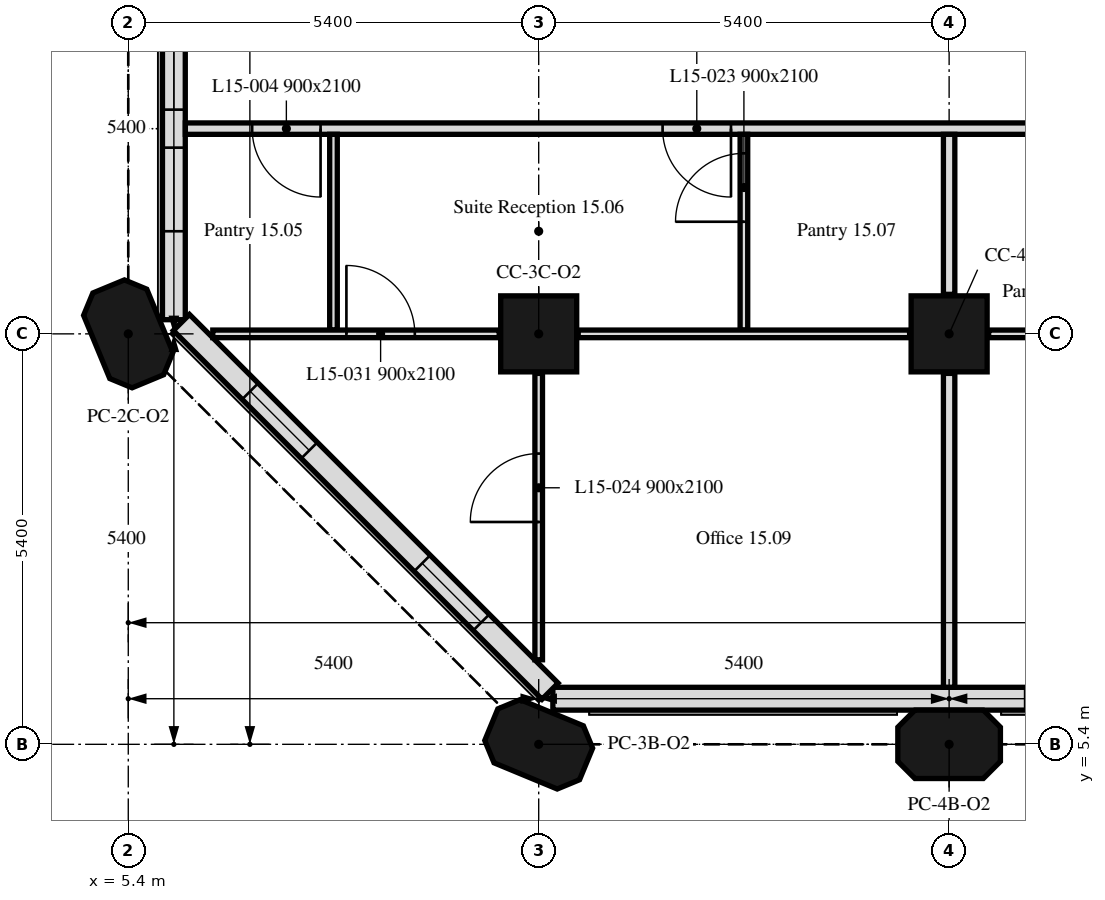
"""IFC4 building model, lengths in metres.
Left out: names, types, materials, properties, quantities, classifications, styles, units other than length and angle.
Written with IfcOpenShell. Run it as: python <this file> out.ifc"""

import sys

from ifc_helpers import new_model, si_unit, direction, frame, frame_2d, origin, origin_2d, place, context, subcontext, project, spatial, polyline, rectangle, outline, extrude, element, fill, save


model = new_model("IFC4")
c1 = context("Model", 3, precision=1e-05, world=origin(), true_north=direction((0.0, 1.0)))
c2 = subcontext(c1, "Body", "Model", "MODEL_VIEW")
j1 = project(units=[si_unit("LENGTHUNIT", "METRE"), si_unit("PLANEANGLEUNIT", "RADIAN")], contexts=[c1])
p1 = place(None, origin())
s1 = spatial("IfcSite", under=j1, at=p1, CompositionType="ELEMENT")
p2 = place(p1, origin())
s2 = spatial("IfcBuilding", under=s1, at=p2, CompositionType="ELEMENT")
p3 = place(p2, frame((0.0, 0.0, 68.8)))
s3 = spatial("IfcBuildingStorey", under=s2, at=p3, CompositionType="ELEMENT", Elevation=68.8)
for number, where, z_axis, x_axis in (
    (1, (10.8, 5.4, 0.0), (0.0, 0.0, 1.0), (-0.924, 0.383, 0.0)),
    (2, (16.2, 5.4, 0.0), (0.0, 0.0, 1.0), (1.0, 0.0, 0.0)),
    (3, (5.4, 10.8, 0.0), (0.0, 0.0, 1.0), (-0.383, 0.924, 0.0)),
):
    element("IfcColumn", number, at=place(p3, frame(where, z_axis=z_axis, x_axis=x_axis)), inside=s3, PredefinedType="COLUMN", context=c2, shape_type="SweptSolid", body=[
        extrude(outline(polyline([(-0.45, -0.45), (0.45, -0.45), (0.675, -0.225), (0.675, 0.225), (0.45, 0.45), (-0.45, 0.45), (-0.675, 0.225), (-0.675, -0.225), (-0.45, -0.45)])), origin(), (0.0, 0.0, 1.0), 3.5),
    ])
for number, where, z_axis, x_axis in (
    (4, (10.8, 10.8, 0.0), (0.0, 0.0, 1.0), (1.0, 0.0, 0.0)),
    (5, (16.2, 10.8, 0.0), (0.0, 0.0, 1.0), (1.0, 0.0, 0.0)),
):
    element("IfcColumn", number, at=place(p3, frame(where, z_axis=z_axis, x_axis=x_axis)), inside=s3, PredefinedType="COLUMN", context=c2, shape_type="SweptSolid", body=[
        extrude(rectangle(XDim=1.0, YDim=1.0, at=origin_2d()), origin(), (0.0, 0.0, 1.0), 3.5),
    ])
p4 = place(p3, frame((10.986, 6.0, 0.0), z_axis=(0.0, 0.0, 1.0), x_axis=(1.0, 0.0, 0.0)))
e6 = element("IfcWall", 6, at=p4, inside=s3, PredefinedType="SOLIDWALL", context=c2, shape_type="SweptSolid", body=[
    extrude(rectangle(XDim=32.027, YDim=0.3, at=frame_2d((16.014, 0.0))), origin(), (0.0, 0.0, 1.0), 3.5),
])
p5 = place(p4, frame((6.214, 0.0, 0.9)))
e7 = element("IfcOpeningElement", 7, at=p5, cuts=e6, PredefinedType="OPENING", context=c2, shape_type="SweptSolid", body=[
    extrude(rectangle(XDim=3.4, YDim=1.7, at=frame_2d((1.7, 0.85))), frame((0.0, 0.16, 0.0), z_axis=(0.0, -1.0, 0.0), x_axis=(1.0, 0.0, 0.0)), (0.0, 0.0, 1.0), 0.32),
])
p6 = place(p4, frame((17.014, 0.0, 0.9)))
e8 = element("IfcOpeningElement", 8, at=p6, cuts=e6, PredefinedType="OPENING", context=c2, shape_type="SweptSolid", body=[
    extrude(rectangle(XDim=3.4, YDim=1.7, at=frame_2d((1.7, 0.85))), frame((0.0, 0.16, 0.0), z_axis=(0.0, -1.0, 0.0), x_axis=(1.0, 0.0, 0.0)), (0.0, 0.0, 1.0), 0.32),
])
p7 = place(p4, frame((27.814, 0.0, 0.9)))
e9 = element("IfcOpeningElement", 9, at=p7, cuts=e6, PredefinedType="OPENING", context=c2, shape_type="SweptSolid", body=[
    extrude(rectangle(XDim=3.4, YDim=1.7, at=frame_2d((1.7, 0.85))), frame((0.0, 0.16, 0.0), z_axis=(0.0, -1.0, 0.0), x_axis=(1.0, 0.0, 0.0)), (0.0, 0.0, 1.0), 0.32),
])
p8 = place(p3, frame((6.0, 16.2, 0.0), z_axis=(0.0, 0.0, 1.0), x_axis=(0.0, -1.0, 0.0)))
e10 = element("IfcWall", 10, at=p8, inside=s3, PredefinedType="SOLIDWALL", context=c2, shape_type="SweptSolid", body=[
    extrude(rectangle(XDim=5.214, YDim=0.3, at=frame_2d((2.607, 0.0))), origin(), (0.0, 0.0, 1.0), 3.5),
])
p9 = place(p8, frame((1.35, 0.0, 0.9)))
e11 = element("IfcOpeningElement", 11, at=p9, cuts=e10, PredefinedType="OPENING", context=c2, shape_type="SweptSolid", body=[
    extrude(rectangle(XDim=1.1, YDim=1.7, at=frame_2d((0.55, 0.85))), frame((0.0, 0.16, 0.0), z_axis=(0.0, -1.0, 0.0), x_axis=(1.0, 0.0, 0.0)), (0.0, 0.0, 1.0), 0.32),
])
p10 = place(p8, frame((2.95, 0.0, 0.9)))
e12 = element("IfcOpeningElement", 12, at=p10, cuts=e10, PredefinedType="OPENING", context=c2, shape_type="SweptSolid", body=[
    extrude(rectangle(XDim=1.1, YDim=1.7, at=frame_2d((0.55, 0.85))), frame((0.0, 0.16, 0.0), z_axis=(0.0, -1.0, 0.0), x_axis=(1.0, 0.0, 0.0)), (0.0, 0.0, 1.0), 0.32),
])
p11 = place(p3, frame((6.099, 10.949, 0.0), z_axis=(0.0, 0.0, 1.0), x_axis=(0.707106781187, -0.707106781187, 0.0)))
e13 = element("IfcWall", 13, at=p11, inside=s3, PredefinedType="SOLIDWALL", context=c2, shape_type="SweptSolid", body=[
    extrude(rectangle(XDim=6.86, YDim=0.3, at=frame_2d((3.43, 0.0))), origin(), (0.0, 0.0, 1.0), 3.5),
])
p12 = place(p11, frame((1.28, 0.0, 0.9)))
e14 = element("IfcOpeningElement", 14, at=p12, cuts=e13, PredefinedType="OPENING", context=c2, shape_type="SweptSolid", body=[
    extrude(rectangle(XDim=1.1, YDim=1.7, at=frame_2d((0.55, 0.85))), frame((0.0, 0.16, 0.0), z_axis=(0.0, -1.0, 0.0), x_axis=(1.0, 0.0, 0.0)), (0.0, 0.0, 1.0), 0.32),
])
p13 = place(p11, frame((4.48, 0.0, 0.9)))
e15 = element("IfcOpeningElement", 15, at=p13, cuts=e13, PredefinedType="OPENING", context=c2, shape_type="SweptSolid", body=[
    extrude(rectangle(XDim=1.1, YDim=1.7, at=frame_2d((0.55, 0.85))), frame((0.0, 0.16, 0.0), z_axis=(0.0, -1.0, 0.0), x_axis=(1.0, 0.0, 0.0)), (0.0, 0.0, 1.0), 0.32),
])
p14 = place(p3, frame((21.5, 13.5, 0.0), z_axis=(0.0, 0.0, 1.0), x_axis=(-1.0, 0.0, 0.0)))
e16 = element("IfcWall", 16, at=p14, inside=s3, PredefinedType="PARTITIONING", context=c2, shape_type="SweptSolid", body=[
    extrude(rectangle(XDim=15.349, YDim=0.15, at=frame_2d((7.675, 0.0))), origin(), (0.0, 0.0, 1.0), 3.5),
])
p15 = place(p14, frame((13.57, 0.0, 0.0)))
e17 = element("IfcOpeningElement", 17, at=p15, cuts=e16, PredefinedType="OPENING", context=c2, shape_type="SweptSolid", body=[
    extrude(rectangle(XDim=0.9, YDim=2.1, at=frame_2d((0.45, 1.05))), frame((0.0, 0.075, 0.0), z_axis=(0.0, -1.0, 0.0), x_axis=(1.0, 0.0, 0.0)), (0.0, 0.0, 1.0), 0.15),
])
p16 = place(p14, frame((2.77, 0.0, 0.0)))
e18 = element("IfcOpeningElement", 18, at=p16, cuts=e16, PredefinedType="OPENING", context=c2, shape_type="SweptSolid", body=[
    extrude(rectangle(XDim=0.9, YDim=2.1, at=frame_2d((0.45, 1.05))), frame((0.0, 0.075, 0.0), z_axis=(0.0, -1.0, 0.0), x_axis=(1.0, 0.0, 0.0)), (0.0, 0.0, 1.0), 0.15),
])
p17 = place(p14, frame((1.53, 0.0, 0.0)))
e19 = element("IfcOpeningElement", 19, at=p17, cuts=e16, PredefinedType="OPENING", context=c2, shape_type="SweptSolid", body=[
    extrude(rectangle(XDim=0.9, YDim=2.1, at=frame_2d((0.45, 1.05))), frame((0.0, 0.075, 0.0), z_axis=(0.0, -1.0, 0.0), x_axis=(1.0, 0.0, 0.0)), (0.0, 0.0, 1.0), 0.15),
])
p18 = place(p14, frame((8.17, 0.0, 0.0)))
e20 = element("IfcOpeningElement", 20, at=p18, cuts=e16, PredefinedType="OPENING", context=c2, shape_type="SweptSolid", body=[
    extrude(rectangle(XDim=0.9, YDim=2.1, at=frame_2d((0.45, 1.05))), frame((0.0, 0.075, 0.0), z_axis=(0.0, -1.0, 0.0), x_axis=(1.0, 0.0, 0.0)), (0.0, 0.0, 1.0), 0.15),
])
p19 = place(p3, frame((8.1, 10.85, 0.0), z_axis=(0.0, 0.0, 1.0), x_axis=(0.0, 1.0, 0.0)))
e21 = element("IfcWall", 21, at=p19, inside=s3, PredefinedType="PARTITIONING", context=c2, shape_type="SweptSolid", body=[
    extrude(rectangle(XDim=2.575, YDim=0.1, at=frame_2d((1.288, 0.0))), origin(), (0.0, 0.0, 1.0), 3.5),
])
p20 = place(p3, frame((6.512, 10.8, 0.0), z_axis=(0.0, 0.0, 1.0), x_axis=(1.0, 0.0, 0.0)))
e22 = element("IfcWall", 22, at=p20, inside=s3, PredefinedType="PARTITIONING", context=c2, shape_type="SweptSolid", body=[
    extrude(rectangle(XDim=3.768, YDim=0.1, at=frame_2d((1.884, 0.0))), origin(), (0.0, 0.0, 1.0), 3.5),
])
p21 = place(p20, frame((1.758, 0.0, 0.0)))
e23 = element("IfcOpeningElement", 23, at=p21, cuts=e22, PredefinedType="OPENING", context=c2, shape_type="SweptSolid", body=[
    extrude(rectangle(XDim=0.9, YDim=2.1, at=frame_2d((0.45, 1.05))), frame((0.0, 0.05, 0.0), z_axis=(0.0, -1.0, 0.0), x_axis=(1.0, 0.0, 0.0)), (0.0, 0.0, 1.0), 0.1),
])
p22 = place(p3, frame((13.5, 10.85, 0.0), z_axis=(0.0, 0.0, 1.0), x_axis=(0.0, 1.0, 0.0)))
e24 = element("IfcWall", 24, at=p22, inside=s3, PredefinedType="PARTITIONING", context=c2, shape_type="SweptSolid", body=[
    extrude(rectangle(XDim=2.575, YDim=0.1, at=frame_2d((1.288, 0.0))), origin(), (0.0, 0.0, 1.0), 3.5),
])
p23 = place(p22, frame((1.425, 0.0, 0.0)))
e25 = element("IfcOpeningElement", 25, at=p23, cuts=e24, PredefinedType="OPENING", context=c2, shape_type="SweptSolid", body=[
    extrude(rectangle(XDim=0.9, YDim=2.1, at=frame_2d((0.45, 1.05))), frame((0.0, 0.05, 0.0), z_axis=(0.0, -1.0, 0.0), x_axis=(1.0, 0.0, 0.0)), (0.0, 0.0, 1.0), 0.1),
])
p24 = place(p3, frame((11.32, 10.8, 0.0), z_axis=(0.0, 0.0, 1.0), x_axis=(1.0, 0.0, 0.0)))
e26 = element("IfcWall", 26, at=p24, inside=s3, PredefinedType="PARTITIONING", context=c2, shape_type="SweptSolid", body=[
    extrude(rectangle(XDim=4.36, YDim=0.1, at=frame_2d((2.18, 0.0))), origin(), (0.0, 0.0, 1.0), 3.5),
])
p25 = place(p3, frame((16.2, 11.32, 0.0), z_axis=(0.0, 0.0, 1.0), x_axis=(0.0, 1.0, 0.0)))
e27 = element("IfcWall", 27, at=p25, inside=s3, PredefinedType="PARTITIONING", context=c2, shape_type="SweptSolid", body=[
    extrude(rectangle(XDim=2.105, YDim=0.15, at=frame_2d((1.052, 0.0))), origin(), (0.0, 0.0, 1.0), 3.5),
])
p26 = place(p3, frame((10.8, 6.512, 0.0), z_axis=(0.0, 0.0, 1.0), x_axis=(0.0, 1.0, 0.0)))
e28 = element("IfcWall", 28, at=p26, inside=s3, PredefinedType="PARTITIONING", context=c2, shape_type="SweptSolid", body=[
    extrude(rectangle(XDim=3.768, YDim=0.1, at=frame_2d((1.884, 0.0))), origin(), (0.0, 0.0, 1.0), 3.5),
])
p27 = place(p26, frame((1.813, 0.0, 0.0)))
e29 = element("IfcOpeningElement", 29, at=p27, cuts=e28, PredefinedType="OPENING", context=c2, shape_type="SweptSolid", body=[
    extrude(rectangle(XDim=0.9, YDim=2.1, at=frame_2d((0.45, 1.05))), frame((0.0, 0.05, 0.0), z_axis=(0.0, -1.0, 0.0), x_axis=(1.0, 0.0, 0.0)), (0.0, 0.0, 1.0), 0.1),
])
p28 = place(p3, frame((16.2, 6.151, 0.0), z_axis=(0.0, 0.0, 1.0), x_axis=(0.0, 1.0, 0.0)))
e30 = element("IfcWall", 30, at=p28, inside=s3, PredefinedType="PARTITIONING", context=c2, shape_type="SweptSolid", body=[
    extrude(rectangle(XDim=4.129, YDim=0.15, at=frame_2d((2.064, 0.0))), origin(), (0.0, 0.0, 1.0), 3.5),
])
p29 = place(p3, frame((16.72, 10.8, 0.0), z_axis=(0.0, 0.0, 1.0), x_axis=(1.0, 0.0, 0.0)))
e31 = element("IfcWall", 31, at=p29, inside=s3, PredefinedType="PARTITIONING", context=c2, shape_type="SweptSolid", body=[
    extrude(rectangle(XDim=4.36, YDim=0.1, at=frame_2d((2.18, 0.0))), origin(), (0.0, 0.0, 1.0), 3.5),
])
p30 = place(p9, origin())
e32 = element("IfcWindow", 32, at=p30, inside=s3, PartitioningType="SINGLE_PANEL", PredefinedType="WINDOW", context=c2, shape_type="SweptSolid", body=[
    extrude(rectangle(XDim=1.1, YDim=1.7, at=frame_2d((0.55, 0.85))), frame((0.0, 0.03, 0.0), z_axis=(0.0, -1.0, 0.0), x_axis=(1.0, 0.0, 0.0)), (0.0, 0.0, 1.0), 0.06),
])
fill(e11, e32)
p31 = place(p10, origin())
e33 = element("IfcWindow", 33, at=p31, inside=s3, PartitioningType="SINGLE_PANEL", PredefinedType="WINDOW", context=c2, shape_type="SweptSolid", body=[
    extrude(rectangle(XDim=1.1, YDim=1.7, at=frame_2d((0.55, 0.85))), frame((0.0, 0.03, 0.0), z_axis=(0.0, -1.0, 0.0), x_axis=(1.0, 0.0, 0.0)), (0.0, 0.0, 1.0), 0.06),
])
fill(e12, e33)
p32 = place(p12, origin())
e34 = element("IfcWindow", 34, at=p32, inside=s3, PartitioningType="SINGLE_PANEL", PredefinedType="WINDOW", context=c2, shape_type="SweptSolid", body=[
    extrude(rectangle(XDim=1.1, YDim=1.7, at=frame_2d((0.55, 0.85))), frame((0.0, 0.03, 0.0), z_axis=(0.0, -1.0, 0.0), x_axis=(1.0, 0.0, 0.0)), (0.0, 0.0, 1.0), 0.06),
])
fill(e14, e34)
p33 = place(p13, origin())
e35 = element("IfcWindow", 35, at=p33, inside=s3, PartitioningType="SINGLE_PANEL", PredefinedType="WINDOW", context=c2, shape_type="SweptSolid", body=[
    extrude(rectangle(XDim=1.1, YDim=1.7, at=frame_2d((0.55, 0.85))), frame((0.0, 0.03, 0.0), z_axis=(0.0, -1.0, 0.0), x_axis=(1.0, 0.0, 0.0)), (0.0, 0.0, 1.0), 0.06),
])
fill(e15, e35)
p34 = place(p15, origin())
e36 = element("IfcDoor", 36, at=p34, inside=s3, OperationType="SINGLE_SWING_RIGHT", PredefinedType="DOOR", context=c2, shape_type="SweptSolid", body=[
    extrude(rectangle(XDim=0.9, YDim=2.1, at=frame_2d((0.45, 1.05))), frame((0.0, 0.025, 0.0), z_axis=(0.0, -1.0, 0.0), x_axis=(1.0, 0.0, 0.0)), (0.0, 0.0, 1.0), 0.05),
])
fill(e17, e36)
p35 = place(p23, origin())
e37 = element("IfcDoor", 37, at=p35, inside=s3, OperationType="SINGLE_SWING_LEFT", PredefinedType="DOOR", context=c2, shape_type="SweptSolid", body=[
    extrude(rectangle(XDim=0.9, YDim=2.1, at=frame_2d((0.45, 1.05))), frame((0.0, 0.025, 0.0), z_axis=(0.0, -1.0, 0.0), x_axis=(1.0, 0.0, 0.0)), (0.0, 0.0, 1.0), 0.05),
])
fill(e25, e37)
p36 = place(p27, origin())
e38 = element("IfcDoor", 38, at=p36, inside=s3, OperationType="SINGLE_SWING_LEFT", PredefinedType="DOOR", context=c2, shape_type="SweptSolid", body=[
    extrude(rectangle(XDim=0.9, YDim=2.1, at=frame_2d((0.45, 1.05))), frame((0.0, 0.025, 0.0), z_axis=(0.0, -1.0, 0.0), x_axis=(1.0, 0.0, 0.0)), (0.0, 0.0, 1.0), 0.05),
])
fill(e29, e38)
p37 = place(p21, origin())
e39 = element("IfcDoor", 39, at=p37, inside=s3, OperationType="SINGLE_SWING_RIGHT", PredefinedType="DOOR", context=c2, shape_type="SweptSolid", body=[
    extrude(rectangle(XDim=0.9, YDim=2.1, at=frame_2d((0.45, 1.05))), frame((0.0, 0.025, 0.0), z_axis=(0.0, -1.0, 0.0), x_axis=(1.0, 0.0, 0.0)), (0.0, 0.0, 1.0), 0.05),
])
fill(e23, e39)
p38 = place(p18, origin())
e40 = element("IfcDoor", 40, at=p38, inside=s3, OperationType="SINGLE_SWING_RIGHT", PredefinedType="DOOR", context=c2, shape_type="SweptSolid", body=[
    extrude(rectangle(XDim=0.9, YDim=2.1, at=frame_2d((0.45, 1.05))), frame((0.0, 0.025, 0.0), z_axis=(0.0, -1.0, 0.0), x_axis=(1.0, 0.0, 0.0)), (0.0, 0.0, 1.0), 0.05),
])
fill(e20, e40)
save(model, sys.argv[1])
